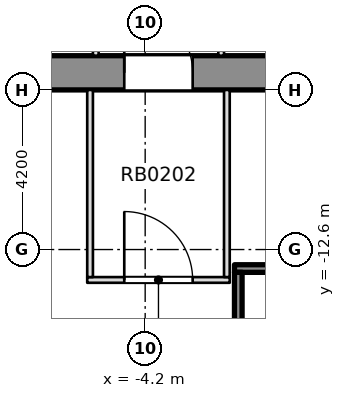
"""IFC4 building model, lengths in metres.
Left out: names, types, materials, properties, quantities, classifications, styles, units other than length and angle.
Written with IfcOpenShell. Run it as: python <this file> out.ifc"""

import sys

from ifc_helpers import new_model, si_unit, direction, frame, frame_2d, origin, place, context, subcontext, project, spatial, rectangle, extrude, element, fill, save


model = new_model("IFC4")
c1 = context("Model", 3, precision=1e-05, world=origin(), true_north=direction((0.0, 1.0)))
c2 = subcontext(c1, "Body", "Model", "MODEL_VIEW")
j1 = project(units=[si_unit("LENGTHUNIT", "METRE"), si_unit("PLANEANGLEUNIT", "RADIAN")], contexts=[c1])
p1 = place(None, origin())
s1 = spatial("IfcSite", under=j1, at=p1, CompositionType="ELEMENT")
p2 = place(p1, origin())
s2 = spatial("IfcBuilding", under=s1, at=p2, CompositionType="ELEMENT")
p3 = place(p2, frame((0.0, 0.0, -8.4)))
s3 = spatial("IfcBuildingStorey", under=s2, at=p3, CompositionType="ELEMENT", Elevation=-8.4)
p4 = place(p3, frame((-11.7, -7.95, 0.0), z_axis=(0.0, 0.0, 1.0), x_axis=(1.0, 0.0, 0.0)))
e1 = element("IfcWall", 1, at=p4, inside=s3, PredefinedType="SHEAR", context=c2, shape_type="SweptSolid", body=[
    extrude(rectangle(XDim=23.4, YDim=0.9, at=frame_2d((11.7, 0.0))), origin(), (0.0, 0.0, 1.0), 3.85),
])
p5 = place(p4, frame((6.95, 0.0, 0.0)))
e2 = element("IfcOpeningElement", 2, at=p5, cuts=e1, PredefinedType="OPENING", context=c2, shape_type="SweptSolid", body=[
    extrude(rectangle(XDim=1.8, YDim=2.1, at=frame_2d((0.9, 1.05))), frame((0.0, 0.46, 0.0), z_axis=(0.0, -1.0, 0.0), x_axis=(1.0, 0.0, 0.0)), (0.0, 0.0, 1.0), 0.92),
])
p6 = place(p4, frame((14.65, 0.0, 0.0)))
e3 = element("IfcOpeningElement", 3, at=p6, cuts=e1, PredefinedType="OPENING", context=c2, shape_type="SweptSolid", body=[
    extrude(rectangle(XDim=1.8, YDim=2.1, at=frame_2d((0.9, 1.05))), frame((0.0, 0.46, 0.0), z_axis=(0.0, -1.0, 0.0), x_axis=(1.0, 0.0, 0.0)), (0.0, 0.0, 1.0), 0.92),
])
p7 = place(p3, frame((-5.725, -13.4, 0.0), z_axis=(0.0, 0.0, 1.0), x_axis=(1.0, 0.0, 0.0)))
e4 = element("IfcWall", 4, at=p7, inside=s3, PredefinedType="PARTITIONING", context=c2, shape_type="SweptSolid", body=[
    extrude(rectangle(XDim=3.75, YDim=0.15, at=frame_2d((1.875, 0.0))), origin(), (0.0, 0.0, 1.0), 3.85),
])
p8 = place(p7, frame((0.975, 0.0, 0.0)))
e5 = element("IfcOpeningElement", 5, at=p8, cuts=e4, PredefinedType="OPENING", context=c2, shape_type="SweptSolid", body=[
    extrude(rectangle(XDim=1.8, YDim=2.1, at=frame_2d((0.9, 1.05))), frame((0.0, 0.085, 0.0), z_axis=(0.0, -1.0, 0.0), x_axis=(1.0, 0.0, 0.0)), (0.0, 0.0, 1.0), 0.17),
])
for number, where, z_axis, x_axis in (
    (6, (-5.65, -13.325, 0.0), (0.0, 0.0, 1.0), (0.0, 1.0, 0.0)),
    (7, (-2.05, -13.325, 0.0), (0.0, 0.0, 1.0), (0.0, 1.0, 0.0)),
):
    element("IfcWall", number, at=place(p3, frame(where, z_axis=z_axis, x_axis=x_axis)), inside=s3, PredefinedType="PARTITIONING", context=c2, shape_type="SweptSolid", body=[
        extrude(rectangle(XDim=4.924, YDim=0.15, at=frame_2d((2.462, 0.0))), origin(), (0.0, 0.0, 1.0), 3.85),
    ])
p9 = place(p3, frame((-5.5, -7.499, 0.0), z_axis=(0.0, 0.0, 1.0), x_axis=(0.0, 1.0, 0.0)))
e8 = element("IfcWall", 8, at=p9, inside=s3, PredefinedType="PARTITIONING", context=c2, shape_type="SweptSolid", body=[
    extrude(rectangle(XDim=11.924, YDim=0.15, at=frame_2d((5.962, 0.0))), origin(), (0.0, 0.0, 1.0), 3.85),
])
p10 = place(p9, frame((0.949, 0.0, 0.0)))
e9 = element("IfcOpeningElement", 9, at=p10, cuts=e8, PredefinedType="OPENING", context=c2, shape_type="SweptSolid", body=[
    extrude(rectangle(XDim=1.1, YDim=2.1, at=frame_2d((0.55, 1.05))), frame((0.0, 0.085, 0.0), z_axis=(0.0, -1.0, 0.0), x_axis=(1.0, 0.0, 0.0)), (0.0, 0.0, 1.0), 0.17),
])
p11 = place(p9, frame((3.949, 0.0, 0.0)))
e10 = element("IfcOpeningElement", 10, at=p11, cuts=e8, PredefinedType="OPENING", context=c2, shape_type="SweptSolid", body=[
    extrude(rectangle(XDim=1.1, YDim=2.1, at=frame_2d((0.55, 1.05))), frame((0.0, 0.085, 0.0), z_axis=(0.0, -1.0, 0.0), x_axis=(1.0, 0.0, 0.0)), (0.0, 0.0, 1.0), 0.17),
])
p12 = place(p9, frame((6.949, 0.0, 0.0)))
e11 = element("IfcOpeningElement", 11, at=p12, cuts=e8, PredefinedType="OPENING", context=c2, shape_type="SweptSolid", body=[
    extrude(rectangle(XDim=1.1, YDim=2.1, at=frame_2d((0.55, 1.05))), frame((0.0, 0.085, 0.0), z_axis=(0.0, -1.0, 0.0), x_axis=(1.0, 0.0, 0.0)), (0.0, 0.0, 1.0), 0.17),
])
p13 = place(p9, frame((9.949, 0.0, 0.0)))
e12 = element("IfcOpeningElement", 12, at=p13, cuts=e8, PredefinedType="OPENING", context=c2, shape_type="SweptSolid", body=[
    extrude(rectangle(XDim=1.1, YDim=2.1, at=frame_2d((0.55, 1.05))), frame((0.0, 0.085, 0.0), z_axis=(0.0, -1.0, 0.0), x_axis=(1.0, 0.0, 0.0)), (0.0, 0.0, 1.0), 0.17),
])
p14 = place(p3, frame((-2.2, -7.499, 0.0), z_axis=(0.0, 0.0, 1.0), x_axis=(0.0, 1.0, 0.0)))
e13 = element("IfcWall", 13, at=p14, inside=s3, PredefinedType="PARTITIONING", context=c2, shape_type="SweptSolid", body=[
    extrude(rectangle(XDim=11.924, YDim=0.15, at=frame_2d((5.962, 0.0))), origin(), (0.0, 0.0, 1.0), 3.85),
])
p15 = place(p14, frame((0.949, 0.0, 0.0)))
e14 = element("IfcOpeningElement", 14, at=p15, cuts=e13, PredefinedType="OPENING", context=c2, shape_type="SweptSolid", body=[
    extrude(rectangle(XDim=1.1, YDim=2.1, at=frame_2d((0.55, 1.05))), frame((0.0, 0.085, 0.0), z_axis=(0.0, -1.0, 0.0), x_axis=(1.0, 0.0, 0.0)), (0.0, 0.0, 1.0), 0.17),
])
p16 = place(p14, frame((3.949, 0.0, 0.0)))
e15 = element("IfcOpeningElement", 15, at=p16, cuts=e13, PredefinedType="OPENING", context=c2, shape_type="SweptSolid", body=[
    extrude(rectangle(XDim=1.1, YDim=2.1, at=frame_2d((0.55, 1.05))), frame((0.0, 0.085, 0.0), z_axis=(0.0, -1.0, 0.0), x_axis=(1.0, 0.0, 0.0)), (0.0, 0.0, 1.0), 0.17),
])
p17 = place(p14, frame((6.949, 0.0, 0.0)))
e16 = element("IfcOpeningElement", 16, at=p17, cuts=e13, PredefinedType="OPENING", context=c2, shape_type="SweptSolid", body=[
    extrude(rectangle(XDim=1.1, YDim=2.1, at=frame_2d((0.55, 1.05))), frame((0.0, 0.085, 0.0), z_axis=(0.0, -1.0, 0.0), x_axis=(1.0, 0.0, 0.0)), (0.0, 0.0, 1.0), 0.17),
])
p18 = place(p14, frame((9.949, 0.0, 0.0)))
e17 = element("IfcOpeningElement", 17, at=p18, cuts=e13, PredefinedType="OPENING", context=c2, shape_type="SweptSolid", body=[
    extrude(rectangle(XDim=1.1, YDim=2.1, at=frame_2d((0.55, 1.05))), frame((0.0, 0.085, 0.0), z_axis=(0.0, -1.0, 0.0), x_axis=(1.0, 0.0, 0.0)), (0.0, 0.0, 1.0), 0.17),
])
p19 = place(p3, frame((-1.85, -13.1, 0.0), z_axis=(0.0, 0.0, 1.0), x_axis=(1.0, 0.0, 0.0)))
e18 = element("IfcWall", 18, at=p19, inside=s3, PredefinedType="SOLIDWALL", context=c2, shape_type="SweptSolid", body=[
    extrude(rectangle(XDim=3.7, YDim=0.2, at=frame_2d((1.85, 0.0))), origin(), (0.0, 0.0, 1.0), 3.85),
])
p20 = place(p3, frame((-1.75, -19.8, 0.0), z_axis=(0.0, 0.0, 1.0), x_axis=(0.0, 1.0, 0.0)))
e19 = element("IfcWall", 19, at=p20, inside=s3, PredefinedType="SOLIDWALL", context=c2, shape_type="SweptSolid", body=[
    extrude(rectangle(XDim=6.6, YDim=0.2, at=frame_2d((3.3, 0.0))), origin(), (0.0, 0.0, 1.0), 3.85),
])
p21 = place(p8, origin())
e20 = element("IfcDoor", 20, at=p21, inside=s3, OperationType="DOUBLE_DOOR_SINGLE_SWING", PredefinedType="DOOR", context=c2, shape_type="SweptSolid", body=[
    extrude(rectangle(XDim=1.8, YDim=2.1, at=frame_2d((0.9, 1.05))), frame((0.0, 0.025, 0.0), z_axis=(0.0, -1.0, 0.0), x_axis=(1.0, 0.0, 0.0)), (0.0, 0.0, 1.0), 0.05),
])
fill(e5, e20)
p22 = place(p5, origin())
e21 = element("IfcDoor", 21, at=p22, inside=s3, OperationType="SINGLE_SWING_LEFT", PredefinedType="DOOR", context=c2, shape_type="SweptSolid", body=[
    extrude(rectangle(XDim=1.8, YDim=2.1, at=frame_2d((0.9, 1.05))), frame((0.0, 0.025, 0.0), z_axis=(0.0, -1.0, 0.0), x_axis=(1.0, 0.0, 0.0)), (0.0, 0.0, 1.0), 0.05),
])
fill(e2, e21)
save(model, sys.argv[1])
